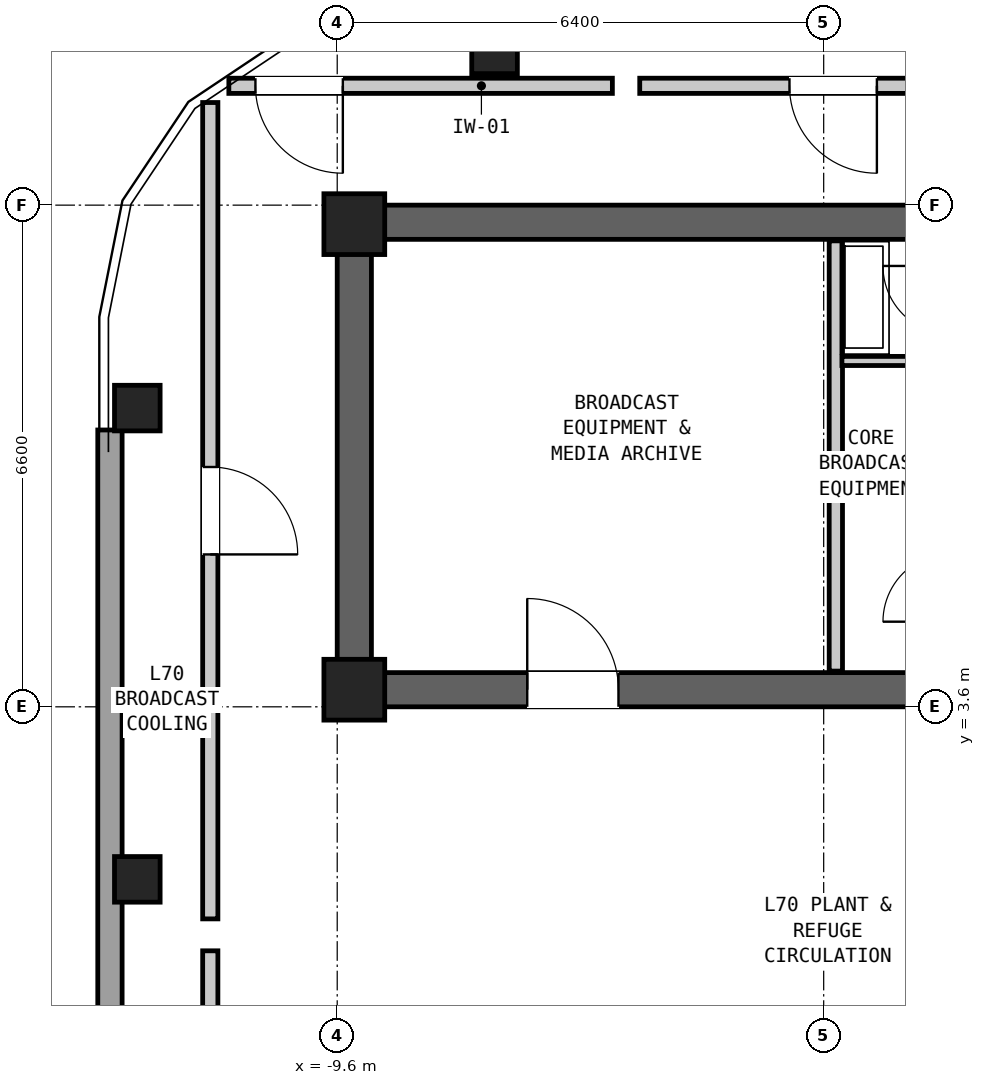
"""IFC4 building model, lengths in metres.
Left out: names, types, materials, properties, quantities, classifications, styles, units other than length and angle.
Written with IfcOpenShell. Run it as: python <this file> out.ifc"""

import sys

from ifc_helpers import new_model, si_unit, direction, frame, frame_2d, origin, origin_2d, place, context, subcontext, project, spatial, rectangle, hollow_rectangle, extrude, element, fill, save


model = new_model("IFC4")
c1 = context("Model", 3, precision=1e-05, world=origin(), true_north=direction((0.0, 1.0)))
c2 = subcontext(c1, "Body", "Model", "MODEL_VIEW")
j1 = project(units=[si_unit("LENGTHUNIT", "METRE"), si_unit("PLANEANGLEUNIT", "RADIAN")], contexts=[c1])
p1 = place(None, origin())
s1 = spatial("IfcSite", under=j1, at=p1, CompositionType="ELEMENT")
p2 = place(p1, origin())
s2 = spatial("IfcBuilding", under=s1, at=p2, CompositionType="ELEMENT")
p3 = place(p2, frame((0.0, 0.0, 238.5)))
s3 = spatial("IfcBuildingStorey", under=s2, at=p3, CompositionType="ELEMENT", Elevation=238.5)
p4 = place(p3, frame((-9.6, 9.975, 0.0), z_axis=(0.0, 0.0, 1.0), x_axis=(1.0, 0.0, 0.0)))
e1 = element("IfcWall", 1, at=p4, inside=s3, PredefinedType="SHEAR", context=c2, shape_type="SweptSolid", body=[
    extrude(rectangle(XDim=19.2, YDim=0.45, at=frame_2d((9.6, 0.0))), origin(), (0.0, 0.0, 1.0), 4.35),
])
p5 = place(p3, frame((-9.6, 3.825, 0.0), z_axis=(0.0, 0.0, 1.0), x_axis=(1.0, 0.0, 0.0)))
e2 = element("IfcWall", 2, at=p5, inside=s3, PredefinedType="SHEAR", context=c2, shape_type="SweptSolid", body=[
    extrude(rectangle(XDim=19.2, YDim=0.45, at=frame_2d((9.6, 0.0))), origin(), (0.0, 0.0, 1.0), 4.35),
])
p6 = place(p5, frame((14.2, 0.0, 0.0)))
e3 = element("IfcOpeningElement", 3, at=p6, cuts=e2, PredefinedType="OPENING", context=c2, shape_type="SweptSolid", body=[
    extrude(rectangle(XDim=1.1, YDim=2.08, at=frame_2d((0.55, 1.04))), frame((0.0, 0.237, 0.0), z_axis=(0.0, -1.0, 0.0), x_axis=(1.0, 0.0, 0.0)), (0.0, 0.0, 1.0), 0.474),
])
p7 = place(p5, frame((8.2, 0.0, 0.0)))
e4 = element("IfcOpeningElement", 4, at=p7, cuts=e2, PredefinedType="OPENING", context=c2, shape_type="SweptSolid", body=[
    extrude(rectangle(XDim=1.15, YDim=2.1, at=frame_2d((0.575, 1.05))), frame((0.0, 0.237, 0.0), z_axis=(0.0, -1.0, 0.0), x_axis=(1.0, 0.0, 0.0)), (0.0, 0.0, 1.0), 0.474),
])
p8 = place(p5, frame((2.5, 0.0, 0.0)))
e5 = element("IfcOpeningElement", 5, at=p8, cuts=e2, PredefinedType="OPENING", context=c2, shape_type="SweptSolid", body=[
    extrude(rectangle(XDim=1.2, YDim=2.1, at=frame_2d((0.6, 1.05))), frame((0.0, 0.237, 0.0), z_axis=(0.0, -1.0, 0.0), x_axis=(1.0, 0.0, 0.0)), (0.0, 0.0, 1.0), 0.474),
])
p9 = place(p3, frame((-9.375, 3.6, 0.0), z_axis=(0.0, 0.0, 1.0), x_axis=(0.0, 1.0, 0.0)))
e6 = element("IfcWall", 6, at=p9, inside=s3, PredefinedType="SHEAR", context=c2, shape_type="SweptSolid", body=[
    extrude(rectangle(XDim=6.6, YDim=0.45, at=frame_2d((3.3, 0.0))), origin(), (0.0, 0.0, 1.0), 4.35),
])
for number, where, z_axis, x_axis in (
    (7, (-7.53, 12.23, 0.0), (0.0, 0.0, 1.0), (1.0, 0.0, 0.0)),
    (8, (-12.23, 7.53, 0.0), (0.0, 0.0, 1.0), (0.0, 1.0, 0.0)),
    (9, (-12.23, 1.33, 0.0), (0.0, 0.0, 1.0), (0.0, 1.0, 0.0)),
):
    element("IfcColumn", number, at=place(p3, frame(where, z_axis=z_axis, x_axis=x_axis)), inside=s3, PredefinedType="COLUMN", context=c2, shape_type="SweptSolid", body=[
        extrude(hollow_rectangle(XDim=0.6, YDim=0.6, WallThickness=0.04, at=origin_2d()), origin(), (0.0, 0.0, 1.0), 4.35),
    ])
for number, where, z_axis, x_axis in (
    (10, (-9.375, 9.95, 0.0), (0.0, 0.0, 1.0), (1.0, 0.0, 0.0)),
    (11, (-9.375, 3.825, 0.0), (0.0, 0.0, 1.0), (1.0, 0.0, 0.0)),
):
    element("IfcColumn", number, at=place(p3, frame(where, z_axis=z_axis, x_axis=x_axis)), inside=s3, PredefinedType="COLUMN", context=c2, shape_type="SweptSolid", body=[
        extrude(rectangle(XDim=0.8, YDim=0.8, at=origin_2d()), origin(), (0.0, 0.0, 1.0), 4.35),
    ])
p10 = place(p3, frame((-12.59, -10.782, 0.0), z_axis=(0.0, 0.0, 1.0), x_axis=(0.0, 1.0, 0.0)))
e12 = element("IfcWall", 12, at=p10, inside=s3, PredefinedType="SOLIDWALL", context=c2, shape_type="SweptSolid", body=[
    extrude(rectangle(XDim=18.024, YDim=0.32, at=frame_2d((9.012, 0.0))), origin(), (0.0, 0.0, 1.0), 2.34),
])
p11 = place(p3, frame((-3.04, 4.07, 0.0), z_axis=(0.0, 0.0, 1.0), x_axis=(0.0, 1.0, 0.0)))
e13 = element("IfcWall", 13, at=p11, inside=s3, PredefinedType="PARTITIONING", context=c2, shape_type="SweptSolid", body=[
    extrude(rectangle(XDim=5.66, YDim=0.175, at=frame_2d((2.83, 0.0))), origin(), (0.0, 0.0, 1.0), 4.16),
])
p12 = place(p3, frame((-2.96, 8.15, 0.0), z_axis=(0.0, 0.0, 1.0), x_axis=(1.0, 0.0, 0.0)))
e14 = element("IfcWall", 14, at=p12, inside=s3, PredefinedType="PARTITIONING", context=c2, shape_type="SweptSolid", body=[
    extrude(rectangle(XDim=1.36, YDim=0.12, at=frame_2d((0.68, 0.0))), origin(), (0.0, 0.0, 1.0), 4.16),
])
p13 = place(p3, frame((-5.98, 11.77, 0.0), z_axis=(0.0, 0.0, 1.0), x_axis=(-1.0, 0.0, 0.0)))
e15 = element("IfcWall", 15, at=p13, inside=s3, PredefinedType="PARTITIONING", context=c2, shape_type="SweptSolid", body=[
    extrude(rectangle(XDim=5.046, YDim=0.2, at=frame_2d((2.523, 0.0))), origin(), (0.0, 0.0, 1.0), 2.34),
])
p14 = place(p13, frame((3.546, 0.0, 0.0)))
e16 = element("IfcOpeningElement", 16, at=p14, cuts=e15, PredefinedType="OPENING", context=c2, shape_type="SweptSolid", body=[
    extrude(rectangle(XDim=1.15, YDim=2.1, at=frame_2d((0.575, 1.05))), frame((0.0, 0.112, 0.0), z_axis=(0.0, -1.0, 0.0), x_axis=(1.0, 0.0, 0.0)), (0.0, 0.0, 1.0), 0.224),
])
p15 = place(p3, frame((-0.53, 11.77, 0.0), z_axis=(0.0, 0.0, 1.0), x_axis=(-1.0, 0.0, 0.0)))
e17 = element("IfcWall", 17, at=p15, inside=s3, PredefinedType="PARTITIONING", context=c2, shape_type="SweptSolid", body=[
    extrude(rectangle(XDim=5.09, YDim=0.2, at=frame_2d((2.545, 0.0))), origin(), (0.0, 0.0, 1.0), 2.34),
])
p16 = place(p15, frame((1.97, 0.0, 0.0)))
e18 = element("IfcOpeningElement", 18, at=p16, cuts=e17, PredefinedType="OPENING", context=c2, shape_type="SweptSolid", body=[
    extrude(rectangle(XDim=1.15, YDim=2.1, at=frame_2d((0.575, 1.05))), frame((0.0, 0.112, 0.0), z_axis=(0.0, -1.0, 0.0), x_axis=(1.0, 0.0, 0.0)), (0.0, 0.0, 1.0), 0.224),
])
p17 = place(p3, frame((-11.27, 0.39, 0.0), z_axis=(0.0, 0.0, 1.0), x_axis=(0.0, -1.0, 0.0)))
e19 = element("IfcWall", 19, at=p17, inside=s3, PredefinedType="PARTITIONING", context=c2, shape_type="SweptSolid", body=[
    extrude(rectangle(XDim=10.68, YDim=0.2, at=frame_2d((5.34, 0.0))), origin(), (0.0, 0.0, 1.0), 4.16),
])
p18 = place(p17, frame((1.561, 0.0, 0.0)))
e20 = element("IfcOpeningElement", 20, at=p18, cuts=e19, PredefinedType="OPENING", context=c2, shape_type="SweptSolid", body=[
    extrude(rectangle(XDim=1.15, YDim=2.1, at=frame_2d((0.575, 1.05))), frame((0.0, 0.112, 0.0), z_axis=(0.0, -1.0, 0.0), x_axis=(1.0, 0.0, 0.0)), (0.0, 0.0, 1.0), 0.224),
])
p19 = place(p3, frame((-11.27, 11.55, 0.0), z_axis=(0.0, 0.0, 1.0), x_axis=(0.0, -1.0, 0.0)))
e21 = element("IfcWall", 21, at=p19, inside=s3, PredefinedType="PARTITIONING", context=c2, shape_type="SweptSolid", body=[
    extrude(rectangle(XDim=10.74, YDim=0.2, at=frame_2d((5.37, 0.0))), origin(), (0.0, 0.0, 1.0), 4.16),
])
p20 = place(p19, frame((4.795, 0.0, 0.0)))
e22 = element("IfcOpeningElement", 22, at=p20, cuts=e21, PredefinedType="OPENING", context=c2, shape_type="SweptSolid", body=[
    extrude(rectangle(XDim=1.15, YDim=2.1, at=frame_2d((0.575, 1.05))), frame((0.0, 0.112, 0.0), z_axis=(0.0, -1.0, 0.0), x_axis=(1.0, 0.0, 0.0)), (0.0, 0.0, 1.0), 0.224),
])
p21 = place(p8, origin())
e23 = element("IfcDoor", 23, at=p21, inside=s3, OperationType="SINGLE_SWING_LEFT", PredefinedType="DOOR", context=c2, shape_type="SweptSolid", body=[
    extrude(rectangle(XDim=1.2, YDim=2.1, at=frame_2d((0.6, 1.05))), frame((0.0, 0.025, 0.0), z_axis=(0.0, -1.0, 0.0), x_axis=(1.0, 0.0, 0.0)), (0.0, 0.0, 1.0), 0.05),
])
fill(e5, e23)
p22 = place(p14, origin())
e24 = element("IfcDoor", 24, at=p22, inside=s3, OperationType="SINGLE_SWING_LEFT", PredefinedType="DOOR", context=c2, shape_type="SweptSolid", body=[
    extrude(rectangle(XDim=1.15, YDim=2.1, at=frame_2d((0.575, 1.05))), frame((0.0, 0.025, 0.0), z_axis=(0.0, -1.0, 0.0), x_axis=(1.0, 0.0, 0.0)), (0.0, 0.0, 1.0), 0.05),
])
fill(e16, e24)
p23 = place(p16, origin())
e25 = element("IfcDoor", 25, at=p23, inside=s3, OperationType="SINGLE_SWING_LEFT", PredefinedType="DOOR", context=c2, shape_type="SweptSolid", body=[
    extrude(rectangle(XDim=1.15, YDim=2.1, at=frame_2d((0.575, 1.05))), frame((0.0, 0.025, 0.0), z_axis=(0.0, -1.0, 0.0), x_axis=(1.0, 0.0, 0.0)), (0.0, 0.0, 1.0), 0.05),
])
fill(e18, e25)
p24 = place(p20, origin())
e26 = element("IfcDoor", 26, at=p24, inside=s3, OperationType="SINGLE_SWING_RIGHT", PredefinedType="DOOR", context=c2, shape_type="SweptSolid", body=[
    extrude(rectangle(XDim=1.15, YDim=2.1, at=frame_2d((0.575, 1.05))), frame((0.0, 0.025, 0.0), z_axis=(0.0, -1.0, 0.0), x_axis=(1.0, 0.0, 0.0)), (0.0, 0.0, 1.0), 0.05),
])
fill(e22, e26)
save(model, sys.argv[1])
